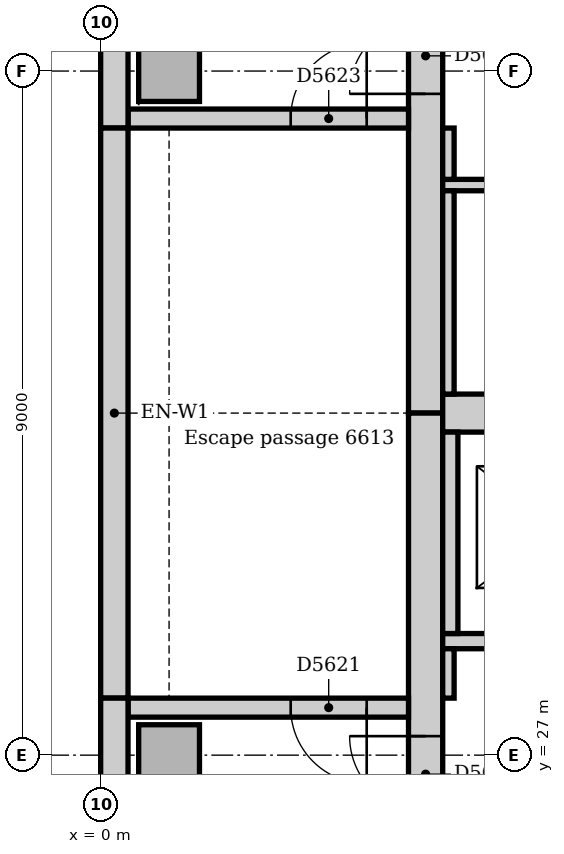
"""IFC4 building model, lengths in metres.
Left out: names, types, materials, properties, quantities, classifications, styles, units other than length and angle.
Written with IfcOpenShell. Run it as: python <this file> out.ifc"""

import sys

from ifc_helpers import new_model, si_unit, direction, frame, frame_2d, origin, origin_2d, place, context, subcontext, project, spatial, rectangle, extrude, element, fill, save


model = new_model("IFC4")
c1 = context("Model", 3, precision=1e-05, world=origin(), true_north=direction((0.0, 1.0)))
c2 = subcontext(c1, "Body", "Model", "MODEL_VIEW")
j1 = project(units=[si_unit("LENGTHUNIT", "METRE"), si_unit("PLANEANGLEUNIT", "RADIAN")], contexts=[c1])
p1 = place(None, origin())
s1 = spatial("IfcSite", under=j1, at=p1, CompositionType="ELEMENT")
p2 = place(p1, origin())
s2 = spatial("IfcBuilding", under=s1, at=p2, CompositionType="ELEMENT")
p3 = place(p2, frame((0.0, 0.0, 275.0)))
s3 = spatial("IfcBuildingStorey", under=s2, at=p3, CompositionType="ELEMENT", Elevation=275.0)
p4 = place(p3, frame((4.275, 42.0, 0.0), z_axis=(0.0, 0.0, 1.0), x_axis=(0.0, -1.0, 0.0)))
e1 = element("IfcWall", 1, at=p4, inside=s3, PredefinedType="SOLIDWALL", context=c2, shape_type="SweptSolid", body=[
    extrude(rectangle(XDim=10.5, YDim=0.45, at=frame_2d((5.25, 0.0))), origin(), (0.0, 0.0, 1.0), 4.0),
])
p5 = place(p4, frame((5.3, 0.0, 0.0)))
e2 = element("IfcOpeningElement", 2, at=p5, cuts=e1, PredefinedType="OPENING", context=c2, shape_type="SweptSolid", body=[
    extrude(rectangle(XDim=1.0, YDim=2.1, at=frame_2d((0.5, 1.05))), frame((0.0, 0.235, 0.0), z_axis=(0.0, -1.0, 0.0), x_axis=(1.0, 0.0, 0.0)), (0.0, 0.0, 1.0), 0.47),
])
p6 = place(p3, frame((4.275, 31.5, 0.0), z_axis=(0.0, 0.0, 1.0), x_axis=(0.0, -1.0, 0.0)))
e3 = element("IfcWall", 3, at=p6, inside=s3, PredefinedType="SOLIDWALL", context=c2, shape_type="SweptSolid", body=[
    extrude(rectangle(XDim=10.5, YDim=0.45, at=frame_2d((5.25, 0.0))), origin(), (0.0, 0.0, 1.0), 4.0),
])
p7 = place(p6, frame((4.25, 0.0, 0.0)))
e4 = element("IfcOpeningElement", 4, at=p7, cuts=e3, PredefinedType="OPENING", context=c2, shape_type="SweptSolid", body=[
    extrude(rectangle(XDim=1.0, YDim=2.1, at=frame_2d((0.5, 1.05))), frame((0.0, 0.235, 0.0), z_axis=(0.0, -1.0, 0.0), x_axis=(1.0, 0.0, 0.0)), (0.0, 0.0, 1.0), 0.47),
])
p8 = place(p3, frame((4.5, 31.5, 0.0), z_axis=(0.0, 0.0, 1.0), x_axis=(1.0, 0.0, 0.0)))
e5 = element("IfcWall", 5, at=p8, inside=s3, PredefinedType="SOLIDWALL", context=c2, shape_type="SweptSolid", body=[
    extrude(rectangle(XDim=18.0, YDim=0.5, at=frame_2d((9.0, 0.0))), origin(), (0.0, 0.0, 1.0), 4.0),
])
p9 = place(p3, frame((4.05, 27.625, 0.0), z_axis=(0.0, 0.0, 1.0), x_axis=(-1.0, 0.0, 0.0)))
e6 = element("IfcWall", 6, at=p9, inside=s3, PredefinedType="SOLIDWALL", context=c2, shape_type="SweptSolid", body=[
    extrude(rectangle(XDim=3.69, YDim=0.25, at=frame_2d((1.845, 0.0))), origin(), (0.0, 0.0, 1.0), 4.0),
])
p10 = place(p9, frame((0.55, 0.0, 0.0)))
e7 = element("IfcOpeningElement", 7, at=p10, cuts=e6, PredefinedType="OPENING", context=c2, shape_type="SweptSolid", body=[
    extrude(rectangle(XDim=1.0, YDim=2.1, at=frame_2d((0.5, 1.05))), frame((0.0, 0.135, 0.0), z_axis=(0.0, -1.0, 0.0), x_axis=(1.0, 0.0, 0.0)), (0.0, 0.0, 1.0), 0.27),
])
p11 = place(p3, frame((0.36, 35.375, 0.0), z_axis=(0.0, 0.0, 1.0), x_axis=(1.0, 0.0, 0.0)))
e8 = element("IfcWall", 8, at=p11, inside=s3, PredefinedType="SOLIDWALL", context=c2, shape_type="SweptSolid", body=[
    extrude(rectangle(XDim=3.69, YDim=0.25, at=frame_2d((1.845, 0.0))), origin(), (0.0, 0.0, 1.0), 4.0),
])
p12 = place(p11, frame((2.14, 0.0, 0.0)))
e9 = element("IfcOpeningElement", 9, at=p12, cuts=e8, PredefinedType="OPENING", context=c2, shape_type="SweptSolid", body=[
    extrude(rectangle(XDim=1.0, YDim=2.1, at=frame_2d((0.5, 1.05))), frame((0.0, 0.135, 0.0), z_axis=(0.0, -1.0, 0.0), x_axis=(1.0, 0.0, 0.0)), (0.0, 0.0, 1.0), 0.27),
])
for number, where, z_axis, x_axis in (
    (10, (0.9, 27.0, 0.0), (0.0, 0.0, 1.0), (1.0, 0.0, 0.0)),
    (11, (0.9, 36.0, 0.0), (0.0, 0.0, 1.0), (1.0, 0.0, 0.0)),
):
    element("IfcColumn", number, at=place(p3, frame(where, z_axis=z_axis, x_axis=x_axis)), inside=s3, PredefinedType="COLUMN", context=c2, shape_type="SweptSolid", body=[
        extrude(rectangle(XDim=0.8, YDim=0.8, at=origin_2d()), origin(), (0.0, 0.0, 1.0), 4.0),
    ])
p13 = place(p3, frame((0.18, 42.0, 0.0), z_axis=(0.0, 0.0, 1.0), x_axis=(0.0, -1.0, 0.0)))
e12 = element("IfcWall", 12, at=p13, inside=s3, PredefinedType="STANDARD", context=c2, shape_type="SweptSolid", body=[
    extrude(rectangle(XDim=6.75, YDim=0.36, at=frame_2d((3.375, 0.0))), origin(), (0.0, 0.0, 1.0), 3.85),
])
p14 = place(p3, frame((0.18, 35.25, 0.0), z_axis=(0.0, 0.0, 1.0), x_axis=(0.0, -1.0, 0.0)))
e13 = element("IfcWall", 13, at=p14, inside=s3, PredefinedType="STANDARD", context=c2, shape_type="SweptSolid", body=[
    extrude(rectangle(XDim=7.5, YDim=0.36, at=frame_2d((3.75, 0.0))), origin(), (0.0, 0.0, 1.0), 3.85),
])
p15 = place(p3, frame((0.18, 27.75, 0.0), z_axis=(0.0, 0.0, 1.0), x_axis=(0.0, -1.0, 0.0)))
e14 = element("IfcWall", 14, at=p15, inside=s3, PredefinedType="STANDARD", context=c2, shape_type="SweptSolid", body=[
    extrude(rectangle(XDim=5.507, YDim=0.36, at=frame_2d((2.754, 0.0))), origin(), (0.0, 0.0, 1.0), 3.85),
])
p16 = place(p3, frame((4.5, 28.5, 0.0), z_axis=(0.0, 0.0, 1.0), x_axis=(1.0, 0.0, 0.0)))
e15 = element("IfcWall", 15, at=p16, inside=s3, PredefinedType="PARTITIONING", context=c2, shape_type="SweptSolid", body=[
    extrude(rectangle(XDim=18.0, YDim=0.2, at=frame_2d((9.0, 0.0))), origin(), (0.0, 0.0, 1.0), 3.85),
])
p17 = place(p16, frame((0.95, 0.0, 0.0)))
e16 = element("IfcOpeningElement", 16, at=p17, cuts=e15, PredefinedType="OPENING", context=c2, shape_type="SweptSolid", body=[
    extrude(rectangle(XDim=1.1, YDim=2.1, at=frame_2d((0.55, 1.05))), frame((0.0, 0.11, 0.0), z_axis=(0.0, -1.0, 0.0), x_axis=(1.0, 0.0, 0.0)), (0.0, 0.0, 1.0), 0.22),
])
p18 = place(p16, frame((3.95, 0.0, 0.0)))
e17 = element("IfcOpeningElement", 17, at=p18, cuts=e15, PredefinedType="OPENING", context=c2, shape_type="SweptSolid", body=[
    extrude(rectangle(XDim=1.1, YDim=2.1, at=frame_2d((0.55, 1.05))), frame((0.0, 0.11, 0.0), z_axis=(0.0, -1.0, 0.0), x_axis=(1.0, 0.0, 0.0)), (0.0, 0.0, 1.0), 0.22),
])
p19 = place(p16, frame((6.95, 0.0, 0.0)))
e18 = element("IfcOpeningElement", 18, at=p19, cuts=e15, PredefinedType="OPENING", context=c2, shape_type="SweptSolid", body=[
    extrude(rectangle(XDim=1.1, YDim=2.1, at=frame_2d((0.55, 1.05))), frame((0.0, 0.11, 0.0), z_axis=(0.0, -1.0, 0.0), x_axis=(1.0, 0.0, 0.0)), (0.0, 0.0, 1.0), 0.22),
])
p20 = place(p16, frame((9.95, 0.0, 0.0)))
e19 = element("IfcOpeningElement", 19, at=p20, cuts=e15, PredefinedType="OPENING", context=c2, shape_type="SweptSolid", body=[
    extrude(rectangle(XDim=1.1, YDim=2.1, at=frame_2d((0.55, 1.05))), frame((0.0, 0.11, 0.0), z_axis=(0.0, -1.0, 0.0), x_axis=(1.0, 0.0, 0.0)), (0.0, 0.0, 1.0), 0.22),
])
p21 = place(p16, frame((12.95, 0.0, 0.0)))
e20 = element("IfcOpeningElement", 20, at=p21, cuts=e15, PredefinedType="OPENING", context=c2, shape_type="SweptSolid", body=[
    extrude(rectangle(XDim=1.1, YDim=2.1, at=frame_2d((0.55, 1.05))), frame((0.0, 0.11, 0.0), z_axis=(0.0, -1.0, 0.0), x_axis=(1.0, 0.0, 0.0)), (0.0, 0.0, 1.0), 0.22),
])
p22 = place(p16, frame((15.95, 0.0, 0.0)))
e21 = element("IfcOpeningElement", 21, at=p22, cuts=e15, PredefinedType="OPENING", context=c2, shape_type="SweptSolid", body=[
    extrude(rectangle(XDim=1.1, YDim=2.1, at=frame_2d((0.55, 1.05))), frame((0.0, 0.11, 0.0), z_axis=(0.0, -1.0, 0.0), x_axis=(1.0, 0.0, 0.0)), (0.0, 0.0, 1.0), 0.22),
])
p23 = place(p3, frame((4.6, 28.6, 0.0), z_axis=(0.0, 0.0, 1.0), x_axis=(0.0, 1.0, 0.0)))
e22 = element("IfcWall", 22, at=p23, inside=s3, PredefinedType="PARTITIONING", context=c2, shape_type="SweptSolid", body=[
    extrude(rectangle(XDim=2.65, YDim=0.2, at=frame_2d((1.325, 0.0))), origin(), (0.0, 0.0, 1.0), 3.85),
])
p24 = place(p3, frame((4.5, 34.5, 0.0), z_axis=(0.0, 0.0, 1.0), x_axis=(1.0, 0.0, 0.0)))
e23 = element("IfcWall", 23, at=p24, inside=s3, PredefinedType="PARTITIONING", context=c2, shape_type="SweptSolid", body=[
    extrude(rectangle(XDim=5.9, YDim=0.15, at=frame_2d((2.95, 0.0))), origin(), (0.0, 0.0, 1.0), 3.85),
])
p25 = place(p24, frame((1.1, 0.0, 0.0)))
e24 = element("IfcOpeningElement", 24, at=p25, cuts=e23, PredefinedType="OPENING", context=c2, shape_type="SweptSolid", body=[
    extrude(rectangle(XDim=0.9, YDim=2.1, at=frame_2d((0.45, 1.05))), frame((0.0, 0.085, 0.0), z_axis=(0.0, -1.0, 0.0), x_axis=(1.0, 0.0, 0.0)), (0.0, 0.0, 1.0), 0.17),
])
p26 = place(p24, frame((3.9, 0.0, 0.0)))
e25 = element("IfcOpeningElement", 25, at=p26, cuts=e23, PredefinedType="OPENING", context=c2, shape_type="SweptSolid", body=[
    extrude(rectangle(XDim=0.9, YDim=2.1, at=frame_2d((0.45, 1.05))), frame((0.0, 0.085, 0.0), z_axis=(0.0, -1.0, 0.0), x_axis=(1.0, 0.0, 0.0)), (0.0, 0.0, 1.0), 0.17),
])
p27 = place(p3, frame((4.575, 34.575, 0.0), z_axis=(0.0, 0.0, 1.0), x_axis=(0.0, 1.0, 0.0)))
e26 = element("IfcWall", 26, at=p27, inside=s3, PredefinedType="PARTITIONING", context=c2, shape_type="SweptSolid", body=[
    extrude(rectangle(XDim=0.675, YDim=0.15, at=frame_2d((0.338, 0.0))), origin(), (0.0, 0.0, 1.0), 3.85),
])
p28 = place(p3, frame((4.575, 31.75, 0.0), z_axis=(0.0, 0.0, 1.0), x_axis=(0.0, 1.0, 0.0)))
e27 = element("IfcWall", 27, at=p28, inside=s3, PredefinedType="PARTITIONING", context=c2, shape_type="SweptSolid", body=[
    extrude(rectangle(XDim=2.675, YDim=0.15, at=frame_2d((1.337, 0.0))), origin(), (0.0, 0.0, 1.0), 3.85),
])
p29 = place(p3, frame((4.575, 27.75, 0.0), z_axis=(0.0, 0.0, 1.0), x_axis=(0.0, 1.0, 0.0)))
e28 = element("IfcWall", 28, at=p29, inside=s3, PredefinedType="PARTITIONING", context=c2, shape_type="SweptSolid", body=[
    extrude(rectangle(XDim=0.65, YDim=0.15, at=frame_2d((0.325, 0.0))), origin(), (0.0, 0.0, 1.0), 3.85),
])
p30 = place(p7, frame((1.0, 0.0, 0.0), z_axis=(0.0, 0.0, 1.0), x_axis=(-1.0, 0.0, 0.0)))
e29 = element("IfcDoor", 29, at=p30, inside=s3, OperationType="SINGLE_SWING_RIGHT", PredefinedType="DOOR", context=c2, shape_type="SweptSolid", body=[
    extrude(rectangle(XDim=1.0, YDim=2.1, at=frame_2d((0.5, 1.05))), frame((0.0, 0.025, 0.0), z_axis=(0.0, -1.0, 0.0), x_axis=(1.0, 0.0, 0.0)), (0.0, 0.0, 1.0), 0.05),
])
fill(e4, e29)
p31 = place(p10, origin())
e30 = element("IfcDoor", 30, at=p31, inside=s3, OperationType="SINGLE_SWING_LEFT", PredefinedType="DOOR", context=c2, shape_type="SweptSolid", body=[
    extrude(rectangle(XDim=1.0, YDim=2.1, at=frame_2d((0.5, 1.05))), frame((0.0, 0.025, 0.0), z_axis=(0.0, -1.0, 0.0), x_axis=(1.0, 0.0, 0.0)), (0.0, 0.0, 1.0), 0.05),
])
fill(e7, e30)
p32 = place(p5, frame((1.0, 0.0, 0.0), z_axis=(0.0, 0.0, 1.0), x_axis=(-1.0, 0.0, 0.0)))
e31 = element("IfcDoor", 31, at=p32, inside=s3, OperationType="SINGLE_SWING_LEFT", PredefinedType="DOOR", context=c2, shape_type="SweptSolid", body=[
    extrude(rectangle(XDim=1.0, YDim=2.1, at=frame_2d((0.5, 1.05))), frame((0.0, 0.025, 0.0), z_axis=(0.0, -1.0, 0.0), x_axis=(1.0, 0.0, 0.0)), (0.0, 0.0, 1.0), 0.05),
])
fill(e2, e31)
p33 = place(p12, origin())
e32 = element("IfcDoor", 32, at=p33, inside=s3, OperationType="SINGLE_SWING_RIGHT", PredefinedType="DOOR", context=c2, shape_type="SweptSolid", body=[
    extrude(rectangle(XDim=1.0, YDim=2.1, at=frame_2d((0.5, 1.05))), frame((0.0, 0.025, 0.0), z_axis=(0.0, -1.0, 0.0), x_axis=(1.0, 0.0, 0.0)), (0.0, 0.0, 1.0), 0.05),
])
fill(e9, e32)
save(model, sys.argv[1])
